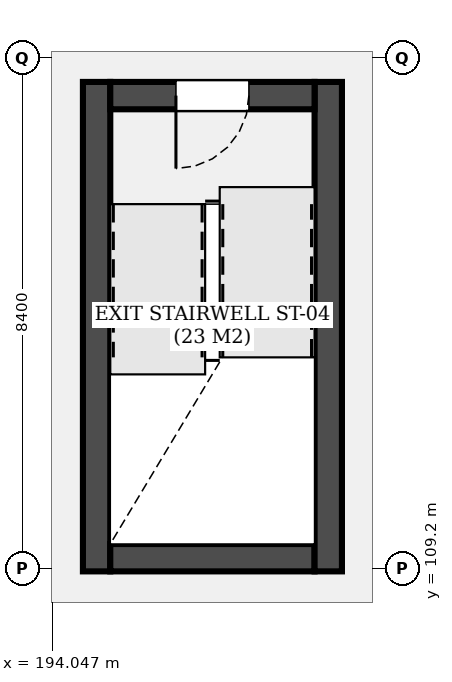
"""IFC4 building model, lengths in metres.
Left out: names, types, materials, properties, quantities, classifications, styles, units other than length and angle.
Written with IfcOpenShell. Run it as: python <this file> out.ifc"""

import sys

from ifc_helpers import new_model, si_unit, direction, frame, frame_2d, origin, place, context, subcontext, project, spatial, rectangle, extrude, element, fill, save


model = new_model("IFC4")
c1 = context("Model", 3, precision=1e-05, world=origin(), true_north=direction((0.0, 1.0)))
c2 = subcontext(c1, "Body", "Model", "MODEL_VIEW")
j1 = project(units=[si_unit("LENGTHUNIT", "METRE"), si_unit("PLANEANGLEUNIT", "RADIAN")], contexts=[c1])
p1 = place(None, origin())
s1 = spatial("IfcSite", under=j1, at=p1, CompositionType="ELEMENT")
p2 = place(p1, origin())
s2 = spatial("IfcBuilding", under=s1, at=p2, CompositionType="ELEMENT")
p3 = place(p2, frame((0.0, 0.0, 9.9)))
s3 = spatial("IfcBuildingStorey", under=s2, at=p3, CompositionType="ELEMENT", Elevation=9.9)
p4 = place(p3, frame((194.775, 117.2, 0.0), z_axis=(0.0, 0.0, 1.0), x_axis=(0.0, -1.0, 0.0)))
e1 = element("IfcWall", 1, at=p4, inside=s3, PredefinedType="SHEAR", context=c2, shape_type="SweptSolid", body=[
    extrude(rectangle(XDim=8.05, YDim=0.45, at=frame_2d((4.025, 0.0))), origin(), (0.0, 0.0, 1.0), 3.6),
])
p5 = place(p3, frame((195.0, 109.375, 0.0), z_axis=(0.0, 0.0, 1.0), x_axis=(1.0, 0.0, 0.0)))
e2 = element("IfcWall", 2, at=p5, inside=s3, PredefinedType="SHEAR", context=c2, shape_type="SweptSolid", body=[
    extrude(rectangle(XDim=3.36, YDim=0.45, at=frame_2d((1.68, 0.0))), origin(), (0.0, 0.0, 1.0), 3.6),
])
p6 = place(p3, frame((198.585, 109.15, 0.0), z_axis=(0.0, 0.0, 1.0), x_axis=(0.0, 1.0, 0.0)))
e3 = element("IfcWall", 3, at=p6, inside=s3, PredefinedType="SHEAR", context=c2, shape_type="SweptSolid", body=[
    extrude(rectangle(XDim=8.05, YDim=0.45, at=frame_2d((4.025, 0.0))), origin(), (0.0, 0.0, 1.0), 3.6),
])
p7 = place(p3, frame((198.36, 116.975, 0.0), z_axis=(0.0, 0.0, 1.0), x_axis=(-1.0, 0.0, 0.0)))
e4 = element("IfcWall", 4, at=p7, inside=s3, PredefinedType="SHEAR", context=c2, shape_type="SweptSolid", body=[
    extrude(rectangle(XDim=3.36, YDim=0.45, at=frame_2d((1.68, 0.0))), origin(), (0.0, 0.0, 1.0), 3.6),
])
p8 = place(p7, frame((1.08, 0.0, 0.0)))
e5 = element("IfcOpeningElement", 5, at=p8, cuts=e4, PredefinedType="OPENING", context=c2, shape_type="SweptSolid", body=[
    extrude(rectangle(XDim=1.2, YDim=2.2, at=frame_2d((0.6, 1.1))), frame((0.0, 0.235, 0.0), z_axis=(0.0, -1.0, 0.0), x_axis=(1.0, 0.0, 0.0)), (0.0, 0.0, 1.0), 0.47),
])
p9 = place(p8, origin())
e6 = element("IfcDoor", 6, at=p9, inside=s3, OperationType="SINGLE_SWING_RIGHT", PredefinedType="DOOR", context=c2, shape_type="SweptSolid", body=[
    extrude(rectangle(XDim=1.2, YDim=2.2, at=frame_2d((0.6, 1.1))), frame((0.0, 0.025, 0.0), z_axis=(0.0, -1.0, 0.0), x_axis=(1.0, 0.0, 0.0)), (0.0, 0.0, 1.0), 0.05),
])
fill(e5, e6)
save(model, sys.argv[1])
